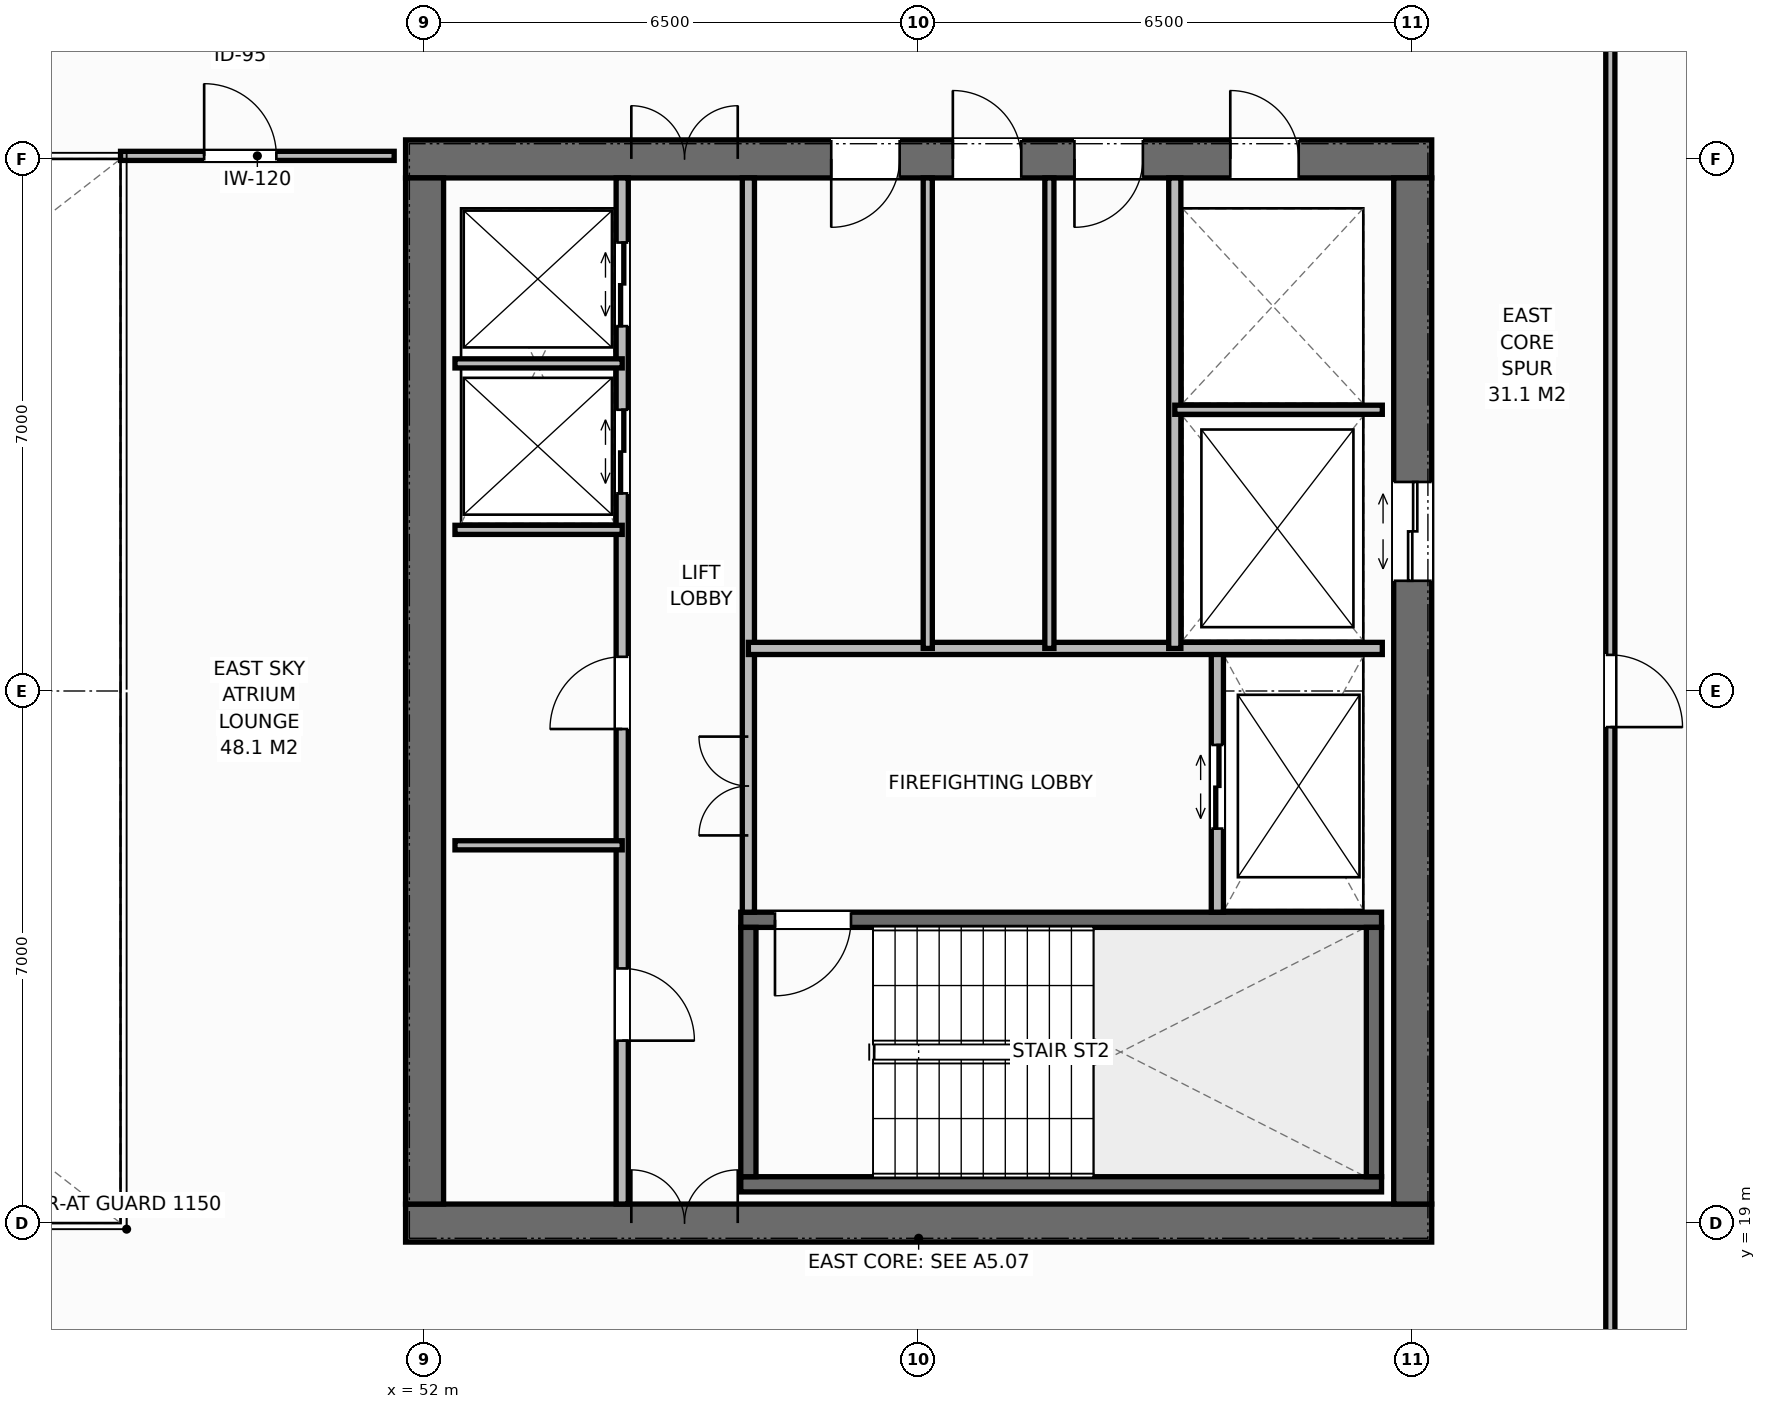
"""IFC4 building model, lengths in metres.
Left out: names, types, materials, properties, quantities, classifications, styles, units other than length and angle.
Written with IfcOpenShell. Run it as: python <this file> out.ifc"""

import sys

from ifc_helpers import new_model, si_unit, direction, frame, frame_2d, origin, place, context, subcontext, project, spatial, rectangle, extrude, element, fill, save


model = new_model("IFC4")
c1 = context("Model", 3, precision=1e-05, world=origin(), true_north=direction((0.0, 1.0)))
c2 = subcontext(c1, "Body", "Model", "MODEL_VIEW")
j1 = project(units=[si_unit("LENGTHUNIT", "METRE"), si_unit("PLANEANGLEUNIT", "RADIAN")], contexts=[c1])
p1 = place(None, origin())
s1 = spatial("IfcSite", under=j1, at=p1, CompositionType="ELEMENT")
p2 = place(p1, origin())
s2 = spatial("IfcBuilding", under=s1, at=p2, CompositionType="ELEMENT")
p3 = place(p2, frame((0.0, 0.0, 248.0)))
s3 = spatial("IfcBuildingStorey", under=s2, at=p3, CompositionType="ELEMENT", Elevation=248.0)
p4 = place(p3, frame((51.75, 19.0, 0.0), z_axis=(0.0, 0.0, 1.0), x_axis=(1.0, 0.0, 0.0)))
e1 = element("IfcWall", 1, at=p4, inside=s3, PredefinedType="SHEAR", context=c2, shape_type="SweptSolid", body=[
    extrude(rectangle(XDim=13.5, YDim=0.5, at=frame_2d((6.75, 0.0))), origin(), (0.0, 0.0, 1.0), 3.8),
])
p5 = place(p4, frame((2.97, 0.0, 0.0)))
e2 = element("IfcOpeningElement", 2, at=p5, cuts=e1, PredefinedType="OPENING", context=c2, shape_type="SweptSolid", body=[
    extrude(rectangle(XDim=1.4, YDim=2.2, at=frame_2d((0.7, 1.1))), frame((0.0, 0.26, 0.0), z_axis=(0.0, -1.0, 0.0), x_axis=(1.0, 0.0, 0.0)), (0.0, 0.0, 1.0), 0.52),
])
p6 = place(p3, frame((51.75, 33.0, 0.0), z_axis=(0.0, 0.0, 1.0), x_axis=(1.0, 0.0, 0.0)))
e3 = element("IfcWall", 3, at=p6, inside=s3, PredefinedType="SHEAR", context=c2, shape_type="SweptSolid", body=[
    extrude(rectangle(XDim=13.5, YDim=0.5, at=frame_2d((6.75, 0.0))), origin(), (0.0, 0.0, 1.0), 3.8),
])
p7 = place(p6, frame((2.97, 0.0, 0.0)))
e4 = element("IfcOpeningElement", 4, at=p7, cuts=e3, PredefinedType="OPENING", context=c2, shape_type="SweptSolid", body=[
    extrude(rectangle(XDim=1.4, YDim=2.2, at=frame_2d((0.7, 1.1))), frame((0.0, 0.26, 0.0), z_axis=(0.0, -1.0, 0.0), x_axis=(1.0, 0.0, 0.0)), (0.0, 0.0, 1.0), 0.52),
])
p8 = place(p6, frame((10.85, 0.0, 0.0)))
e5 = element("IfcOpeningElement", 5, at=p8, cuts=e3, PredefinedType="OPENING", context=c2, shape_type="SweptSolid", body=[
    extrude(rectangle(XDim=0.9, YDim=2.15, at=frame_2d((0.45, 1.075))), frame((0.0, 0.26, 0.0), z_axis=(0.0, -1.0, 0.0), x_axis=(1.0, 0.0, 0.0)), (0.0, 0.0, 1.0), 0.52),
])
p9 = place(p6, frame((5.6, 0.0, 0.0)))
e6 = element("IfcOpeningElement", 6, at=p9, cuts=e3, PredefinedType="OPENING", context=c2, shape_type="SweptSolid", body=[
    extrude(rectangle(XDim=0.9, YDim=2.15, at=frame_2d((0.45, 1.075))), frame((0.0, 0.26, 0.0), z_axis=(0.0, -1.0, 0.0), x_axis=(1.0, 0.0, 0.0)), (0.0, 0.0, 1.0), 0.52),
])
p10 = place(p6, frame((7.2, 0.0, 0.0)))
e7 = element("IfcOpeningElement", 7, at=p10, cuts=e3, PredefinedType="OPENING", context=c2, shape_type="SweptSolid", body=[
    extrude(rectangle(XDim=0.9, YDim=2.15, at=frame_2d((0.45, 1.075))), frame((0.0, 0.26, 0.0), z_axis=(0.0, -1.0, 0.0), x_axis=(1.0, 0.0, 0.0)), (0.0, 0.0, 1.0), 0.52),
])
p11 = place(p6, frame((8.8, 0.0, 0.0)))
e8 = element("IfcOpeningElement", 8, at=p11, cuts=e3, PredefinedType="OPENING", context=c2, shape_type="SweptSolid", body=[
    extrude(rectangle(XDim=0.9, YDim=2.15, at=frame_2d((0.45, 1.075))), frame((0.0, 0.26, 0.0), z_axis=(0.0, -1.0, 0.0), x_axis=(1.0, 0.0, 0.0)), (0.0, 0.0, 1.0), 0.52),
])
p12 = place(p3, frame((52.0, 19.25, 0.0), z_axis=(0.0, 0.0, 1.0), x_axis=(0.0, 1.0, 0.0)))
e9 = element("IfcWall", 9, at=p12, inside=s3, PredefinedType="SHEAR", context=c2, shape_type="SweptSolid", body=[
    extrude(rectangle(XDim=13.5, YDim=0.5, at=frame_2d((6.75, 0.0))), origin(), (0.0, 0.0, 1.0), 3.8),
])
p13 = place(p3, frame((65.0, 19.25, 0.0), z_axis=(0.0, 0.0, 1.0), x_axis=(0.0, 1.0, 0.0)))
e10 = element("IfcWall", 10, at=p13, inside=s3, PredefinedType="SHEAR", context=c2, shape_type="SweptSolid", body=[
    extrude(rectangle(XDim=13.5, YDim=0.5, at=frame_2d((6.75, 0.0))), origin(), (0.0, 0.0, 1.0), 3.8),
])
p14 = place(p13, frame((8.2, 0.0, 0.0)))
e11 = element("IfcOpeningElement", 11, at=p14, cuts=e10, PredefinedType="OPENING", context=c2, shape_type="SweptSolid", body=[
    extrude(rectangle(XDim=1.3, YDim=2.2, at=frame_2d((0.65, 1.1))), frame((0.0, 0.26, 0.0), z_axis=(0.0, -1.0, 0.0), x_axis=(1.0, 0.0, 0.0)), (0.0, 0.0, 1.0), 0.52),
])
p15 = place(p3, frame((56.16, 19.51, 0.0), z_axis=(0.0, 0.0, 1.0), x_axis=(1.0, 0.0, 0.0)))
e12 = element("IfcWall", 12, at=p15, inside=s3, PredefinedType="SHEAR", context=c2, shape_type="SweptSolid", body=[
    extrude(rectangle(XDim=8.43, YDim=0.2, at=frame_2d((4.215, 0.0))), origin(), (0.0, 0.0, 1.0), 3.8),
])
p16 = place(p3, frame((56.16, 22.99, 0.0), z_axis=(0.0, 0.0, 1.0), x_axis=(1.0, 0.0, 0.0)))
e13 = element("IfcWall", 13, at=p16, inside=s3, PredefinedType="SHEAR", context=c2, shape_type="SweptSolid", body=[
    extrude(rectangle(XDim=8.43, YDim=0.2, at=frame_2d((4.215, 0.0))), origin(), (0.0, 0.0, 1.0), 3.8),
])
p17 = place(p16, frame((0.45, 0.0, 0.0)))
e14 = element("IfcOpeningElement", 14, at=p17, cuts=e13, PredefinedType="OPENING", context=c2, shape_type="SweptSolid", body=[
    extrude(rectangle(XDim=1.0, YDim=2.15, at=frame_2d((0.5, 1.075))), frame((0.0, 0.11, 0.0), z_axis=(0.0, -1.0, 0.0), x_axis=(1.0, 0.0, 0.0)), (0.0, 0.0, 1.0), 0.22),
])
for number, where, z_axis, x_axis in (
    (15, (56.26, 19.61, 0.0), (0.0, 0.0, 1.0), (0.0, 1.0, 0.0)),
    (16, (64.49, 19.61, 0.0), (0.0, 0.0, 1.0), (0.0, 1.0, 0.0)),
):
    element("IfcWall", number, at=place(p3, frame(where, z_axis=z_axis, x_axis=x_axis)), inside=s3, PredefinedType="SHEAR", context=c2, shape_type="SweptSolid", body=[
        extrude(rectangle(XDim=3.28, YDim=0.2, at=frame_2d((1.64, 0.0))), origin(), (0.0, 0.0, 1.0), 3.8),
    ])
p18 = place(p3, frame((54.6, 19.25, 0.0), z_axis=(0.0, 0.0, 1.0), x_axis=(0.0, 1.0, 0.0)))
e17 = element("IfcWall", 17, at=p18, inside=s3, PredefinedType="STANDARD", context=c2, shape_type="SweptSolid", body=[
    extrude(rectangle(XDim=13.5, YDim=0.16, at=frame_2d((6.75, 0.0))), origin(), (0.0, 0.0, 1.0), 3.58),
])
p19 = place(p18, frame((2.15, 0.0, 0.0)))
e18 = element("IfcOpeningElement", 18, at=p19, cuts=e17, PredefinedType="OPENING", context=c2, shape_type="SweptSolid", body=[
    extrude(rectangle(XDim=0.95, YDim=2.15, at=frame_2d((0.475, 1.075))), frame((0.0, 0.09, 0.0), z_axis=(0.0, -1.0, 0.0), x_axis=(1.0, 0.0, 0.0)), (0.0, 0.0, 1.0), 0.18),
])
p20 = place(p18, frame((6.25, 0.0, 0.0)))
e19 = element("IfcOpeningElement", 19, at=p20, cuts=e17, PredefinedType="OPENING", context=c2, shape_type="SweptSolid", body=[
    extrude(rectangle(XDim=0.95, YDim=2.15, at=frame_2d((0.475, 1.075))), frame((0.0, 0.09, 0.0), z_axis=(0.0, -1.0, 0.0), x_axis=(1.0, 0.0, 0.0)), (0.0, 0.0, 1.0), 0.18),
])
p21 = place(p18, frame((9.35, 0.0, 0.0)))
e20 = element("IfcOpeningElement", 20, at=p21, cuts=e17, PredefinedType="OPENING", context=c2, shape_type="SweptSolid", body=[
    extrude(rectangle(XDim=1.1, YDim=2.2, at=frame_2d((0.55, 1.1))), frame((0.0, 0.09, 0.0), z_axis=(0.0, -1.0, 0.0), x_axis=(1.0, 0.0, 0.0)), (0.0, 0.0, 1.0), 0.18),
])
p22 = place(p18, frame((11.55, 0.0, 0.0)))
e21 = element("IfcOpeningElement", 21, at=p22, cuts=e17, PredefinedType="OPENING", context=c2, shape_type="SweptSolid", body=[
    extrude(rectangle(XDim=1.1, YDim=2.2, at=frame_2d((0.55, 1.1))), frame((0.0, 0.09, 0.0), z_axis=(0.0, -1.0, 0.0), x_axis=(1.0, 0.0, 0.0)), (0.0, 0.0, 1.0), 0.18),
])
p23 = place(p3, frame((56.26, 23.09, 0.0), z_axis=(0.0, 0.0, 1.0), x_axis=(0.0, 1.0, 0.0)))
e22 = element("IfcWall", 22, at=p23, inside=s3, PredefinedType="STANDARD", context=c2, shape_type="SweptSolid", body=[
    extrude(rectangle(XDim=9.66, YDim=0.16, at=frame_2d((4.83, 0.0))), origin(), (0.0, 0.0, 1.0), 3.58),
])
p24 = place(p23, frame((1.01, 0.0, 0.0)))
e23 = element("IfcOpeningElement", 23, at=p24, cuts=e22, PredefinedType="OPENING", context=c2, shape_type="SweptSolid", body=[
    extrude(rectangle(XDim=1.3, YDim=2.2, at=frame_2d((0.65, 1.1))), frame((0.0, 0.09, 0.0), z_axis=(0.0, -1.0, 0.0), x_axis=(1.0, 0.0, 0.0)), (0.0, 0.0, 1.0), 0.18),
])
for number, where, z_axis, x_axis in (
    (24, (52.4, 23.97, 0.0), (0.0, 0.0, 1.0), (1.0, 0.0, 0.0)),
    (25, (52.4, 28.12, 0.0), (0.0, 0.0, 1.0), (1.0, 0.0, 0.0)),
    (26, (52.4, 30.31, 0.0), (0.0, 0.0, 1.0), (1.0, 0.0, 0.0)),
):
    element("IfcWall", number, at=place(p3, frame(where, z_axis=z_axis, x_axis=x_axis)), inside=s3, PredefinedType="PARTITIONING", context=c2, shape_type="SweptSolid", body=[
        extrude(rectangle(XDim=2.2, YDim=0.12, at=frame_2d((1.1, 0.0))), origin(), (0.0, 0.0, 1.0), 3.58),
    ])
p25 = place(p3, frame((62.43, 23.09, 0.0), z_axis=(0.0, 0.0, 1.0), x_axis=(0.0, 1.0, 0.0)))
e27 = element("IfcWall", 27, at=p25, inside=s3, PredefinedType="STANDARD", context=c2, shape_type="SweptSolid", body=[
    extrude(rectangle(XDim=3.47, YDim=0.16, at=frame_2d((1.735, 0.0))), origin(), (0.0, 0.0, 1.0), 3.58),
])
p26 = place(p25, frame((1.1, 0.0, 0.0)))
e28 = element("IfcOpeningElement", 28, at=p26, cuts=e27, PredefinedType="OPENING", context=c2, shape_type="SweptSolid", body=[
    extrude(rectangle(XDim=1.1, YDim=2.2, at=frame_2d((0.55, 1.1))), frame((0.0, 0.09, 0.0), z_axis=(0.0, -1.0, 0.0), x_axis=(1.0, 0.0, 0.0)), (0.0, 0.0, 1.0), 0.18),
])
p27 = place(p3, frame((56.26, 26.56, 0.0), z_axis=(0.0, 0.0, 1.0), x_axis=(1.0, 0.0, 0.0)))
e29 = element("IfcWall", 29, at=p27, inside=s3, PredefinedType="STANDARD", context=c2, shape_type="SweptSolid", body=[
    extrude(rectangle(XDim=8.34, YDim=0.16, at=frame_2d((4.17, 0.0))), origin(), (0.0, 0.0, 1.0), 3.58),
])
p28 = place(p3, frame((61.87, 26.56, 0.0), z_axis=(0.0, 0.0, 1.0), x_axis=(0.0, 1.0, 0.0)))
e30 = element("IfcWall", 30, at=p28, inside=s3, PredefinedType="STANDARD", context=c2, shape_type="SweptSolid", body=[
    extrude(rectangle(XDim=6.19, YDim=0.16, at=frame_2d((3.095, 0.0))), origin(), (0.0, 0.0, 1.0), 3.58),
])
p29 = place(p3, frame((61.87, 29.7, 0.0), z_axis=(0.0, 0.0, 1.0), x_axis=(1.0, 0.0, 0.0)))
e31 = element("IfcWall", 31, at=p29, inside=s3, PredefinedType="PARTITIONING", context=c2, shape_type="SweptSolid", body=[
    extrude(rectangle(XDim=2.73, YDim=0.12, at=frame_2d((1.365, 0.0))), origin(), (0.0, 0.0, 1.0), 3.58),
])
for number, where, z_axis, x_axis in (
    (32, (58.62, 26.56, 0.0), (0.0, 0.0, 1.0), (0.0, 1.0, 0.0)),
    (33, (60.22, 26.56, 0.0), (0.0, 0.0, 1.0), (0.0, 1.0, 0.0)),
):
    element("IfcWall", number, at=place(p3, frame(where, z_axis=z_axis, x_axis=x_axis)), inside=s3, PredefinedType="PARTITIONING", context=c2, shape_type="SweptSolid", body=[
        extrude(rectangle(XDim=6.19, YDim=0.12, at=frame_2d((3.095, 0.0))), origin(), (0.0, 0.0, 1.0), 3.58),
    ])
p30 = place(p3, frame((48.0, 33.04, 0.0), z_axis=(0.0, 0.0, 1.0), x_axis=(1.0, 0.0, 0.0)))
e34 = element("IfcWall", 34, at=p30, inside=s3, PredefinedType="PARTITIONING", context=c2, shape_type="SweptSolid", body=[
    extrude(rectangle(XDim=3.6, YDim=0.12, at=frame_2d((1.8, 0.0))), origin(), (0.0, 0.0, 1.0), 3.32),
])
p31 = place(p30, frame((1.1, 0.0, 0.0)))
e35 = element("IfcOpeningElement", 35, at=p31, cuts=e34, PredefinedType="OPENING", context=c2, shape_type="SweptSolid", body=[
    extrude(rectangle(XDim=0.95, YDim=2.15, at=frame_2d((0.475, 1.075))), frame((0.0, 0.07, 0.0), z_axis=(0.0, -1.0, 0.0), x_axis=(1.0, 0.0, 0.0)), (0.0, 0.0, 1.0), 0.14),
])
p32 = place(p3, frame((67.6, 16.5, 0.0), z_axis=(0.0, 0.0, 1.0), x_axis=(0.0, 1.0, 0.0)))
e36 = element("IfcWall", 36, at=p32, inside=s3, PredefinedType="PARTITIONING", context=c2, shape_type="SweptSolid", body=[
    extrude(rectangle(XDim=19.0, YDim=0.12, at=frame_2d((9.5, 0.0))), origin(), (0.0, 0.0, 1.0), 3.58),
])
p33 = place(p32, frame((9.025, 0.0, 0.0)))
e37 = element("IfcOpeningElement", 37, at=p33, cuts=e36, PredefinedType="OPENING", context=c2, shape_type="SweptSolid", body=[
    extrude(rectangle(XDim=0.95, YDim=2.15, at=frame_2d((0.475, 1.075))), frame((0.0, 0.07, 0.0), z_axis=(0.0, -1.0, 0.0), x_axis=(1.0, 0.0, 0.0)), (0.0, 0.0, 1.0), 0.14),
])
p34 = place(p5, origin())
e38 = element("IfcDoor", 38, at=p34, inside=s3, OperationType="DOUBLE_DOOR_SINGLE_SWING", PredefinedType="DOOR", context=c2, shape_type="SweptSolid", body=[
    extrude(rectangle(XDim=1.4, YDim=2.2, at=frame_2d((0.7, 1.1))), frame((0.0, 0.075, 0.0), z_axis=(0.0, -1.0, 0.0), x_axis=(1.0, 0.0, 0.0)), (0.0, 0.0, 1.0), 0.05),
])
fill(e2, e38)
p35 = place(p7, origin())
e39 = element("IfcDoor", 39, at=p35, inside=s3, OperationType="DOUBLE_DOOR_SINGLE_SWING", PredefinedType="DOOR", context=c2, shape_type="SweptSolid", body=[
    extrude(rectangle(XDim=1.4, YDim=2.2, at=frame_2d((0.7, 1.1))), frame((0.0, -0.025, 0.0), z_axis=(0.0, -1.0, 0.0), x_axis=(1.0, 0.0, 0.0)), (0.0, 0.0, 1.0), 0.05),
])
fill(e4, e39)
p36 = place(p19, origin())
e40 = element("IfcDoor", 40, at=p36, inside=s3, OperationType="SINGLE_SWING_RIGHT", PredefinedType="DOOR", context=c2, shape_type="SweptSolid", body=[
    extrude(rectangle(XDim=0.95, YDim=2.15, at=frame_2d((0.475, 1.075))), frame((0.0, 0.025, 0.0), z_axis=(0.0, -1.0, 0.0), x_axis=(1.0, 0.0, 0.0)), (0.0, 0.0, 1.0), 0.05),
])
fill(e18, e40)
p37 = place(p20, origin())
e41 = element("IfcDoor", 41, at=p37, inside=s3, OperationType="SINGLE_SWING_LEFT", PredefinedType="DOOR", context=c2, shape_type="SweptSolid", body=[
    extrude(rectangle(XDim=0.95, YDim=2.15, at=frame_2d((0.475, 1.075))), frame((0.0, 0.025, 0.0), z_axis=(0.0, -1.0, 0.0), x_axis=(1.0, 0.0, 0.0)), (0.0, 0.0, 1.0), 0.05),
])
fill(e19, e41)
p38 = place(p21, origin())
e42 = element("IfcDoor", 42, at=p38, inside=s3, OperationType="DOUBLE_DOOR_SLIDING", PredefinedType="DOOR", context=c2, shape_type="SweptSolid", body=[
    extrude(rectangle(XDim=1.1, YDim=2.2, at=frame_2d((0.55, 1.1))), frame((0.0, 0.025, 0.0), z_axis=(0.0, -1.0, 0.0), x_axis=(1.0, 0.0, 0.0)), (0.0, 0.0, 1.0), 0.05),
])
fill(e20, e42)
p39 = place(p22, origin())
e43 = element("IfcDoor", 43, at=p39, inside=s3, OperationType="DOUBLE_DOOR_SLIDING", PredefinedType="DOOR", context=c2, shape_type="SweptSolid", body=[
    extrude(rectangle(XDim=1.1, YDim=2.2, at=frame_2d((0.55, 1.1))), frame((0.0, 0.025, 0.0), z_axis=(0.0, -1.0, 0.0), x_axis=(1.0, 0.0, 0.0)), (0.0, 0.0, 1.0), 0.05),
])
fill(e21, e43)
p40 = place(p17, origin())
e44 = element("IfcDoor", 44, at=p40, inside=s3, OperationType="SINGLE_SWING_RIGHT", PredefinedType="DOOR", context=c2, shape_type="SweptSolid", body=[
    extrude(rectangle(XDim=1.0, YDim=2.15, at=frame_2d((0.5, 1.075))), frame((0.0, 0.025, 0.0), z_axis=(0.0, -1.0, 0.0), x_axis=(1.0, 0.0, 0.0)), (0.0, 0.0, 1.0), 0.05),
])
fill(e14, e44)
p41 = place(p26, origin())
e45 = element("IfcDoor", 45, at=p41, inside=s3, OperationType="DOUBLE_DOOR_SLIDING", PredefinedType="DOOR", context=c2, shape_type="SweptSolid", body=[
    extrude(rectangle(XDim=1.1, YDim=2.2, at=frame_2d((0.55, 1.1))), frame((0.0, 0.025, 0.0), z_axis=(0.0, -1.0, 0.0), x_axis=(1.0, 0.0, 0.0)), (0.0, 0.0, 1.0), 0.05),
])
fill(e28, e45)
p42 = place(p24, origin())
e46 = element("IfcDoor", 46, at=p42, inside=s3, OperationType="DOUBLE_DOOR_SINGLE_SWING", PredefinedType="DOOR", context=c2, shape_type="SweptSolid", body=[
    extrude(rectangle(XDim=1.3, YDim=2.2, at=frame_2d((0.65, 1.1))), frame((0.0, 0.025, 0.0), z_axis=(0.0, -1.0, 0.0), x_axis=(1.0, 0.0, 0.0)), (0.0, 0.0, 1.0), 0.05),
])
fill(e23, e46)
p43 = place(p14, origin())
e47 = element("IfcDoor", 47, at=p43, inside=s3, OperationType="DOUBLE_DOOR_SLIDING", PredefinedType="DOOR", context=c2, shape_type="SweptSolid", body=[
    extrude(rectangle(XDim=1.3, YDim=2.2, at=frame_2d((0.65, 1.1))), frame((0.0, 0.025, 0.0), z_axis=(0.0, -1.0, 0.0), x_axis=(1.0, 0.0, 0.0)), (0.0, 0.0, 1.0), 0.05),
])
fill(e11, e47)
p44 = place(p8, origin())
e48 = element("IfcDoor", 48, at=p44, inside=s3, OperationType="SINGLE_SWING_LEFT", PredefinedType="DOOR", context=c2, shape_type="SweptSolid", body=[
    extrude(rectangle(XDim=0.9, YDim=2.15, at=frame_2d((0.45, 1.075))), frame((0.0, -0.025, 0.0), z_axis=(0.0, -1.0, 0.0), x_axis=(1.0, 0.0, 0.0)), (0.0, 0.0, 1.0), 0.05),
])
fill(e5, e48)
p45 = place(p9, origin())
e49 = element("IfcDoor", 49, at=p45, inside=s3, OperationType="SINGLE_SWING_RIGHT", PredefinedType="DOOR", context=c2, shape_type="SweptSolid", body=[
    extrude(rectangle(XDim=0.9, YDim=2.15, at=frame_2d((0.45, 1.075))), frame((0.0, -0.025, 0.0), z_axis=(0.0, -1.0, 0.0), x_axis=(1.0, 0.0, 0.0)), (0.0, 0.0, 1.0), 0.05),
])
fill(e6, e49)
p46 = place(p10, origin())
e50 = element("IfcDoor", 50, at=p46, inside=s3, OperationType="SINGLE_SWING_LEFT", PredefinedType="DOOR", context=c2, shape_type="SweptSolid", body=[
    extrude(rectangle(XDim=0.9, YDim=2.15, at=frame_2d((0.45, 1.075))), frame((0.0, -0.025, 0.0), z_axis=(0.0, -1.0, 0.0), x_axis=(1.0, 0.0, 0.0)), (0.0, 0.0, 1.0), 0.05),
])
fill(e7, e50)
p47 = place(p11, origin())
e51 = element("IfcDoor", 51, at=p47, inside=s3, OperationType="SINGLE_SWING_RIGHT", PredefinedType="DOOR", context=c2, shape_type="SweptSolid", body=[
    extrude(rectangle(XDim=0.9, YDim=2.15, at=frame_2d((0.45, 1.075))), frame((0.0, -0.025, 0.0), z_axis=(0.0, -1.0, 0.0), x_axis=(1.0, 0.0, 0.0)), (0.0, 0.0, 1.0), 0.05),
])
fill(e8, e51)
p48 = place(p31, origin())
e52 = element("IfcDoor", 52, at=p48, inside=s3, OperationType="SINGLE_SWING_LEFT", PredefinedType="DOOR", context=c2, shape_type="SweptSolid", body=[
    extrude(rectangle(XDim=0.95, YDim=2.15, at=frame_2d((0.475, 1.075))), frame((0.0, 0.025, 0.0), z_axis=(0.0, -1.0, 0.0), x_axis=(1.0, 0.0, 0.0)), (0.0, 0.0, 1.0), 0.05),
])
fill(e35, e52)
p49 = place(p33, origin())
e53 = element("IfcDoor", 53, at=p49, inside=s3, OperationType="SINGLE_SWING_RIGHT", PredefinedType="DOOR", context=c2, shape_type="SweptSolid", body=[
    extrude(rectangle(XDim=0.95, YDim=2.15, at=frame_2d((0.475, 1.075))), frame((0.0, 0.025, 0.0), z_axis=(0.0, -1.0, 0.0), x_axis=(1.0, 0.0, 0.0)), (0.0, 0.0, 1.0), 0.05),
])
fill(e37, e53)
save(model, sys.argv[1])
